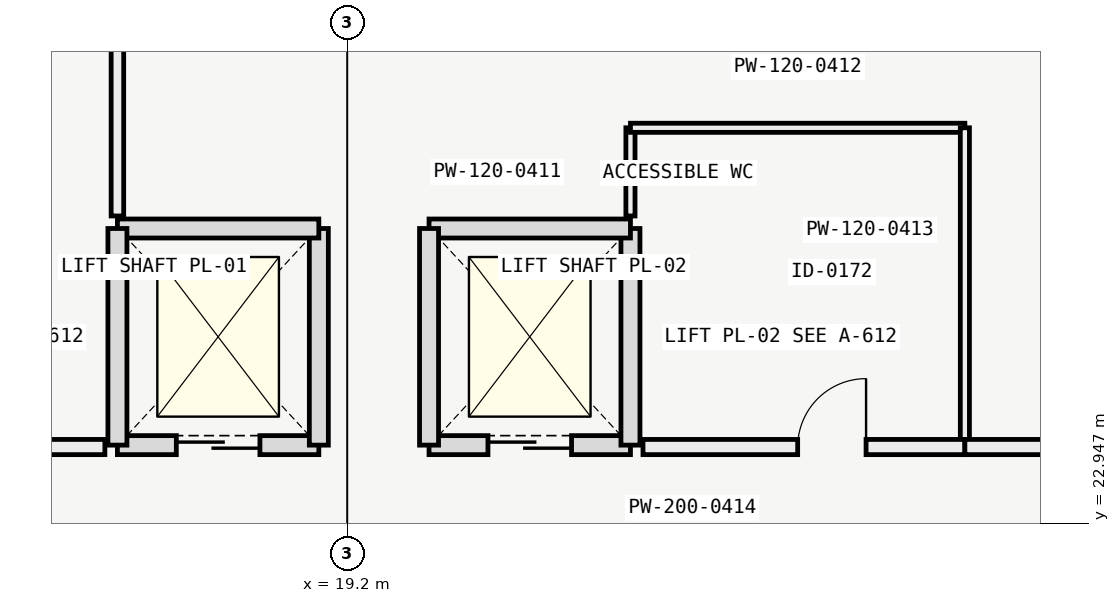
"""IFC4 building model, lengths in metres.
Left out: names, types, materials, properties, quantities, classifications, styles, units other than length and angle.
Written with IfcOpenShell. Run it as: python <this file> out.ifc"""

import sys

from ifc_helpers import new_model, si_unit, direction, frame, frame_2d, origin, place, context, subcontext, project, spatial, rectangle, extrude, element, fill, save


model = new_model("IFC4")
c1 = context("Model", 3, precision=1e-05, world=origin(), true_north=direction((0.0, 1.0)))
c2 = subcontext(c1, "Body", "Model", "MODEL_VIEW")
j1 = project(units=[si_unit("LENGTHUNIT", "METRE"), si_unit("PLANEANGLEUNIT", "RADIAN")], contexts=[c1])
p1 = place(None, origin())
s1 = spatial("IfcSite", under=j1, at=p1, CompositionType="ELEMENT")
p2 = place(p1, origin())
s2 = spatial("IfcBuilding", under=s1, at=p2, CompositionType="ELEMENT")
p3 = place(p2, frame((0.0, 0.0, 13.8)))
s3 = spatial("IfcBuildingStorey", under=s2, at=p3, CompositionType="ELEMENT", Elevation=13.8)
p4 = place(p3, frame((16.175, 23.975, 0.0), z_axis=(0.0, 0.0, 1.0), x_axis=(1.0, 0.0, 0.0)))
e1 = element("IfcWall", 1, at=p4, inside=s3, PredefinedType="SOLIDWALL", context=c2, shape_type="SweptSolid", body=[
    extrude(rectangle(XDim=2.65, YDim=0.25, at=frame_2d((1.325, 0.0))), origin(), (0.0, 0.0, 1.0), 3.95),
])
p5 = place(p4, frame((0.775, 0.0, 0.0)))
e2 = element("IfcOpeningElement", 2, at=p5, cuts=e1, PredefinedType="OPENING", context=c2, shape_type="SweptSolid", body=[
    extrude(rectangle(XDim=1.1, YDim=2.1, at=frame_2d((0.55, 1.05))), frame((0.0, 0.135, 0.0), z_axis=(0.0, -1.0, 0.0), x_axis=(1.0, 0.0, 0.0)), (0.0, 0.0, 1.0), 0.27),
])
p6 = place(p3, frame((18.825, 23.975, 0.0), z_axis=(0.0, 0.0, 1.0), x_axis=(0.0, 1.0, 0.0)))
e3 = element("IfcWall", 3, at=p6, inside=s3, PredefinedType="SOLIDWALL", context=c2, shape_type="SweptSolid", body=[
    extrude(rectangle(XDim=2.85, YDim=0.25, at=frame_2d((1.425, 0.0))), origin(), (0.0, 0.0, 1.0), 3.95),
])
p7 = place(p3, frame((18.825, 26.825, 0.0), z_axis=(0.0, 0.0, 1.0), x_axis=(-1.0, 0.0, 0.0)))
e4 = element("IfcWall", 4, at=p7, inside=s3, PredefinedType="SOLIDWALL", context=c2, shape_type="SweptSolid", body=[
    extrude(rectangle(XDim=2.65, YDim=0.25, at=frame_2d((1.325, 0.0))), origin(), (0.0, 0.0, 1.0), 3.95),
])
p8 = place(p3, frame((16.175, 26.825, 0.0), z_axis=(0.0, 0.0, 1.0), x_axis=(0.0, -1.0, 0.0)))
e5 = element("IfcWall", 5, at=p8, inside=s3, PredefinedType="SOLIDWALL", context=c2, shape_type="SweptSolid", body=[
    extrude(rectangle(XDim=2.85, YDim=0.25, at=frame_2d((1.425, 0.0))), origin(), (0.0, 0.0, 1.0), 3.95),
])
p9 = place(p3, frame((20.275, 23.975, 0.0), z_axis=(0.0, 0.0, 1.0), x_axis=(1.0, 0.0, 0.0)))
e6 = element("IfcWall", 6, at=p9, inside=s3, PredefinedType="SOLIDWALL", context=c2, shape_type="SweptSolid", body=[
    extrude(rectangle(XDim=2.65, YDim=0.25, at=frame_2d((1.325, 0.0))), origin(), (0.0, 0.0, 1.0), 3.95),
])
p10 = place(p9, frame((0.775, 0.0, 0.0)))
e7 = element("IfcOpeningElement", 7, at=p10, cuts=e6, PredefinedType="OPENING", context=c2, shape_type="SweptSolid", body=[
    extrude(rectangle(XDim=1.1, YDim=2.1, at=frame_2d((0.55, 1.05))), frame((0.0, 0.135, 0.0), z_axis=(0.0, -1.0, 0.0), x_axis=(1.0, 0.0, 0.0)), (0.0, 0.0, 1.0), 0.27),
])
p11 = place(p3, frame((22.925, 23.975, 0.0), z_axis=(0.0, 0.0, 1.0), x_axis=(0.0, 1.0, 0.0)))
e8 = element("IfcWall", 8, at=p11, inside=s3, PredefinedType="SOLIDWALL", context=c2, shape_type="SweptSolid", body=[
    extrude(rectangle(XDim=2.85, YDim=0.25, at=frame_2d((1.425, 0.0))), origin(), (0.0, 0.0, 1.0), 3.95),
])
p12 = place(p3, frame((22.925, 26.825, 0.0), z_axis=(0.0, 0.0, 1.0), x_axis=(-1.0, 0.0, 0.0)))
e9 = element("IfcWall", 9, at=p12, inside=s3, PredefinedType="SOLIDWALL", context=c2, shape_type="SweptSolid", body=[
    extrude(rectangle(XDim=2.65, YDim=0.25, at=frame_2d((1.325, 0.0))), origin(), (0.0, 0.0, 1.0), 3.95),
])
p13 = place(p3, frame((20.275, 26.825, 0.0), z_axis=(0.0, 0.0, 1.0), x_axis=(0.0, -1.0, 0.0)))
e10 = element("IfcWall", 10, at=p13, inside=s3, PredefinedType="SOLIDWALL", context=c2, shape_type="SweptSolid", body=[
    extrude(rectangle(XDim=2.85, YDim=0.25, at=frame_2d((1.425, 0.0))), origin(), (0.0, 0.0, 1.0), 3.95),
])
p14 = place(p3, frame((22.925, 26.99, 0.0), z_axis=(0.0, 0.0, 1.0), x_axis=(0.0, 1.0, 0.0)))
e11 = element("IfcWall", 11, at=p14, inside=s3, PredefinedType="PARTITIONING", context=c2, shape_type="SweptSolid", body=[
    extrude(rectangle(XDim=1.16, YDim=0.12, at=frame_2d((0.58, 0.0))), origin(), (0.0, 0.0, 1.0), 3.85),
])
p15 = place(p3, frame((22.925, 28.15, 0.0), z_axis=(0.0, 0.0, 1.0), x_axis=(1.0, 0.0, 0.0)))
e12 = element("IfcWall", 12, at=p15, inside=s3, PredefinedType="PARTITIONING", context=c2, shape_type="SweptSolid", body=[
    extrude(rectangle(XDim=4.4, YDim=0.12, at=frame_2d((2.2, 0.0))), origin(), (0.0, 0.0, 1.0), 3.85),
])
p16 = place(p3, frame((27.325, 23.95, 0.0), z_axis=(0.0, 0.0, 1.0), x_axis=(0.0, 1.0, 0.0)))
e13 = element("IfcWall", 13, at=p16, inside=s3, PredefinedType="PARTITIONING", context=c2, shape_type="SweptSolid", body=[
    extrude(rectangle(XDim=4.2, YDim=0.12, at=frame_2d((2.1, 0.0))), origin(), (0.0, 0.0, 1.0), 3.85),
])
p17 = place(p3, frame((23.09, 23.95, 0.0), z_axis=(0.0, 0.0, 1.0), x_axis=(1.0, 0.0, 0.0)))
e14 = element("IfcWall", 14, at=p17, inside=s3, PredefinedType="PARTITIONING", context=c2, shape_type="SweptSolid", body=[
    extrude(rectangle(XDim=4.235, YDim=0.2, at=frame_2d((2.117, 0.0))), origin(), (0.0, 0.0, 1.0), 3.85),
])
p18 = place(p17, frame((2.035, 0.0, 0.0)))
e15 = element("IfcOpeningElement", 15, at=p18, cuts=e14, PredefinedType="OPENING", context=c2, shape_type="SweptSolid", body=[
    extrude(rectangle(XDim=0.9, YDim=2.05, at=frame_2d((0.45, 1.025))), frame((0.0, 0.11, 0.0), z_axis=(0.0, -1.0, 0.0), x_axis=(1.0, 0.0, 0.0)), (0.0, 0.0, 1.0), 0.22),
])
p19 = place(p3, frame((16.175, 26.99, 0.0), z_axis=(0.0, 0.0, 1.0), x_axis=(0.0, 1.0, 0.0)))
e16 = element("IfcWall", 16, at=p19, inside=s3, PredefinedType="PARTITIONING", context=c2, shape_type="SweptSolid", body=[
    extrude(rectangle(XDim=13.66, YDim=0.165, at=frame_2d((6.83, 0.0))), origin(), (0.0, 0.0, 1.0), 3.33),
])
p20 = place(p3, frame((0.15, 23.95, 0.0), z_axis=(0.0, 0.0, 1.0), x_axis=(1.0, 0.0, 0.0)))
e17 = element("IfcWall", 17, at=p20, inside=s3, PredefinedType="PARTITIONING", context=c2, shape_type="SweptSolid", body=[
    extrude(rectangle(XDim=15.86, YDim=0.2, at=frame_2d((7.93, 0.0))), origin(), (0.0, 0.0, 1.0), 3.28),
])
p21 = place(p20, frame((6.05, 0.0, 0.0)))
e18 = element("IfcOpeningElement", 18, at=p21, cuts=e17, PredefinedType="OPENING", context=c2, shape_type="SweptSolid", body=[
    extrude(rectangle(XDim=1.4, YDim=2.2, at=frame_2d((0.7, 1.1))), frame((0.0, 0.11, 0.0), z_axis=(0.0, -1.0, 0.0), x_axis=(1.0, 0.0, 0.0)), (0.0, 0.0, 1.0), 0.22),
])
p22 = place(p20, frame((13.0, 0.0, 0.0)))
e19 = element("IfcOpeningElement", 19, at=p22, cuts=e17, PredefinedType="OPENING", context=c2, shape_type="SweptSolid", body=[
    extrude(rectangle(XDim=0.95, YDim=2.1, at=frame_2d((0.475, 1.05))), frame((0.0, 0.11, 0.0), z_axis=(0.0, -1.0, 0.0), x_axis=(1.0, 0.0, 0.0)), (0.0, 0.0, 1.0), 0.22),
])
p23 = place(p3, frame((27.325, 23.95, 0.0), z_axis=(0.0, 0.0, 1.0), x_axis=(1.0, 0.0, 0.0)))
e20 = element("IfcWall", 20, at=p23, inside=s3, PredefinedType="PARTITIONING", context=c2, shape_type="SweptSolid", body=[
    extrude(rectangle(XDim=6.985, YDim=0.2, at=frame_2d((3.493, 0.0))), origin(), (0.0, 0.0, 1.0), 3.28),
])
p24 = place(p23, frame((4.1, 0.0, 0.0)))
e21 = element("IfcOpeningElement", 21, at=p24, cuts=e20, PredefinedType="OPENING", context=c2, shape_type="SweptSolid", body=[
    extrude(rectangle(XDim=1.4, YDim=2.2, at=frame_2d((0.7, 1.1))), frame((0.0, 0.11, 0.0), z_axis=(0.0, -1.0, 0.0), x_axis=(1.0, 0.0, 0.0)), (0.0, 0.0, 1.0), 0.22),
])
p25 = place(p5, origin())
e22 = element("IfcDoor", 22, at=p25, inside=s3, OperationType="SLIDING_TO_LEFT", PredefinedType="DOOR", context=c2, shape_type="SweptSolid", body=[
    extrude(rectangle(XDim=1.1, YDim=2.1, at=frame_2d((0.55, 1.05))), frame((0.0, 0.025, 0.0), z_axis=(0.0, -1.0, 0.0), x_axis=(1.0, 0.0, 0.0)), (0.0, 0.0, 1.0), 0.05),
])
fill(e2, e22)
p26 = place(p10, origin())
e23 = element("IfcDoor", 23, at=p26, inside=s3, OperationType="SLIDING_TO_LEFT", PredefinedType="DOOR", context=c2, shape_type="SweptSolid", body=[
    extrude(rectangle(XDim=1.1, YDim=2.1, at=frame_2d((0.55, 1.05))), frame((0.0, 0.025, 0.0), z_axis=(0.0, -1.0, 0.0), x_axis=(1.0, 0.0, 0.0)), (0.0, 0.0, 1.0), 0.05),
])
fill(e7, e23)
p27 = place(p18, origin())
e24 = element("IfcDoor", 24, at=p27, inside=s3, OperationType="SINGLE_SWING_RIGHT", PredefinedType="DOOR", context=c2, shape_type="SweptSolid", body=[
    extrude(rectangle(XDim=0.9, YDim=2.05, at=frame_2d((0.45, 1.025))), frame((0.0, 0.025, 0.0), z_axis=(0.0, -1.0, 0.0), x_axis=(1.0, 0.0, 0.0)), (0.0, 0.0, 1.0), 0.05),
])
fill(e15, e24)
save(model, sys.argv[1])
